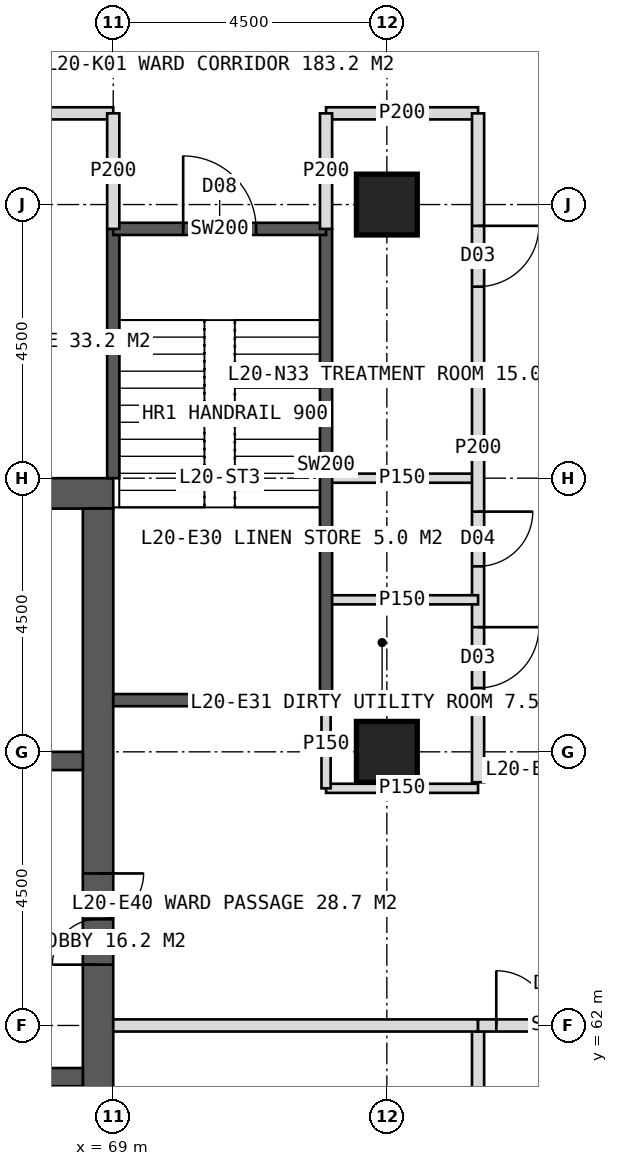
"""IFC4 building model, lengths in metres.
Left out: names, types, materials, properties, quantities, classifications, styles, units other than length and angle.
Written with IfcOpenShell. Run it as: python <this file> out.ifc"""

import sys

from ifc_helpers import new_model, si_unit, direction, frame, frame_2d, origin, origin_2d, place, context, subcontext, project, spatial, rectangle, hollow_rectangle, extrude, element, fill, save


model = new_model("IFC4")
c1 = context("Model", 3, precision=1e-05, world=origin(), true_north=direction((0.0, 1.0)))
c2 = subcontext(c1, "Body", "Model", "MODEL_VIEW")
j1 = project(units=[si_unit("LENGTHUNIT", "METRE"), si_unit("PLANEANGLEUNIT", "RADIAN")], contexts=[c1])
p1 = place(None, origin())
s1 = spatial("IfcSite", under=j1, at=p1, CompositionType="ELEMENT")
p2 = place(p1, origin())
s2 = spatial("IfcBuilding", under=s1, at=p2, CompositionType="ELEMENT")
p3 = place(p2, frame((0.0, 0.0, 87.0)))
s3 = spatial("IfcBuildingStorey", under=s2, at=p3, CompositionType="ELEMENT", Elevation=87.0)
p4 = place(p3, frame((51.0, 70.75, 0.0), z_axis=(0.0, 0.0, 1.0), x_axis=(1.0, 0.0, 0.0)))
e1 = element("IfcWall", 1, at=p4, inside=s3, PredefinedType="SHEAR", context=c2, shape_type="SweptSolid", body=[
    extrude(rectangle(XDim=18.0, YDim=0.5, at=frame_2d((9.0, 0.0))), origin(), (0.0, 0.0, 1.0), 4.0),
])
p5 = place(p4, frame((8.1, 0.0, 0.0)))
e2 = element("IfcOpeningElement", 2, at=p5, cuts=e1, PredefinedType="OPENING", context=c2, shape_type="SweptSolid", body=[
    extrude(rectangle(XDim=1.8, YDim=2.2, at=frame_2d((0.9, 1.1))), frame((0.0, 0.26, 0.0), z_axis=(0.0, -1.0, 0.0), x_axis=(1.0, 0.0, 0.0)), (0.0, 0.0, 1.0), 0.52),
])
p6 = place(p3, frame((68.75, 53.5, 0.0), z_axis=(0.0, 0.0, 1.0), x_axis=(0.0, 1.0, 0.0)))
e3 = element("IfcWall", 3, at=p6, inside=s3, PredefinedType="SHEAR", context=c2, shape_type="SweptSolid", body=[
    extrude(rectangle(XDim=17.0, YDim=0.5, at=frame_2d((8.5, 0.0))), origin(), (0.0, 0.0, 1.0), 4.0),
])
p7 = place(p6, frame((9.5, 0.0, 0.0)))
e4 = element("IfcOpeningElement", 4, at=p7, cuts=e3, PredefinedType="OPENING", context=c2, shape_type="SweptSolid", body=[
    extrude(rectangle(XDim=1.5, YDim=2.2, at=frame_2d((0.75, 1.1))), frame((0.0, 0.26, 0.0), z_axis=(0.0, -1.0, 0.0), x_axis=(1.0, 0.0, 0.0)), (0.0, 0.0, 1.0), 0.52),
])
p8 = place(p3, frame((65.2, 61.15, 0.0), z_axis=(0.0, 0.0, 1.0), x_axis=(1.0, 0.0, 0.0)))
e5 = element("IfcWall", 5, at=p8, inside=s3, PredefinedType="SHEAR", context=c2, shape_type="SweptSolid", body=[
    extrude(rectangle(XDim=3.3, YDim=0.3, at=frame_2d((1.65, 0.0))), origin(), (0.0, 0.0, 1.0), 4.0),
])
p9 = place(p8, frame((1.05, 0.0, 0.0)))
e6 = element("IfcOpeningElement", 6, at=p9, cuts=e5, PredefinedType="OPENING", context=c2, shape_type="SweptSolid", body=[
    extrude(rectangle(XDim=1.2, YDim=2.1, at=frame_2d((0.6, 1.05))), frame((0.0, 0.16, 0.0), z_axis=(0.0, -1.0, 0.0), x_axis=(1.0, 0.0, 0.0)), (0.0, 0.0, 1.0), 0.32),
])
p10 = place(p3, frame((65.2, 66.35, 0.0), z_axis=(0.0, 0.0, 1.0), x_axis=(1.0, 0.0, 0.0)))
e7 = element("IfcWall", 7, at=p10, inside=s3, PredefinedType="SHEAR", context=c2, shape_type="SweptSolid", body=[
    extrude(rectangle(XDim=3.3, YDim=0.3, at=frame_2d((1.65, 0.0))), origin(), (0.0, 0.0, 1.0), 4.0),
])
p11 = place(p10, frame((1.05, 0.0, 0.0)))
e8 = element("IfcOpeningElement", 8, at=p11, cuts=e7, PredefinedType="OPENING", context=c2, shape_type="SweptSolid", body=[
    extrude(rectangle(XDim=1.2, YDim=2.2, at=frame_2d((0.6, 1.1))), frame((0.0, 0.16, 0.0), z_axis=(0.0, -1.0, 0.0), x_axis=(1.0, 0.0, 0.0)), (0.0, 0.0, 1.0), 0.32),
])
for number, where, z_axis, x_axis in (
    (9, (73.5, 75.5, 0.0), (0.0, 0.0, 1.0), (1.0, 0.0, 0.0)),
    (10, (73.5, 66.5, 0.0), (0.0, 0.0, 1.0), (1.0, 0.0, 0.0)),
):
    element("IfcColumn", number, at=place(p3, frame(where, z_axis=z_axis, x_axis=x_axis)), inside=s3, PredefinedType="COLUMN", context=c2, shape_type="SweptSolid", body=[
        extrude(hollow_rectangle(XDim=1.0, YDim=1.0, WallThickness=0.1, at=origin_2d()), origin(), (0.0, 0.0, 1.0), 4.0),
    ])
p12 = place(p3, frame((62.25, 77.0, 0.0), z_axis=(0.0, 0.0, 1.0), x_axis=(1.0, 0.0, 0.0)))
e11 = element("IfcWall", 11, at=p12, inside=s3, PredefinedType="PARTITIONING", context=c2, shape_type="SweptSolid", body=[
    extrude(rectangle(XDim=6.75, YDim=0.2, at=frame_2d((3.375, 0.0))), origin(), (0.0, 0.0, 1.0), 3.75),
])
p13 = place(p12, frame((3.55, 0.0, 0.0)))
e12 = element("IfcOpeningElement", 12, at=p13, cuts=e11, PredefinedType="OPENING", context=c2, shape_type="SweptSolid", body=[
    extrude(rectangle(XDim=1.0, YDim=2.1, at=frame_2d((0.5, 1.05))), frame((0.0, 0.11, 0.0), z_axis=(0.0, -1.0, 0.0), x_axis=(1.0, 0.0, 0.0)), (0.0, 0.0, 1.0), 0.22),
])
p14 = place(p3, frame((72.5, 77.0, 0.0), z_axis=(0.0, 0.0, 1.0), x_axis=(1.0, 0.0, 0.0)))
e13 = element("IfcWall", 13, at=p14, inside=s3, PredefinedType="PARTITIONING", context=c2, shape_type="SweptSolid", body=[
    extrude(rectangle(XDim=2.5, YDim=0.2, at=frame_2d((1.25, 0.0))), origin(), (0.0, 0.0, 1.0), 3.75),
])
p15 = place(p3, frame((72.5, 71.0, 0.0), z_axis=(0.0, 0.0, 1.0), x_axis=(1.0, 0.0, 0.0)))
e14 = element("IfcWall", 14, at=p15, inside=s3, PredefinedType="PARTITIONING", context=c2, shape_type="SweptSolid", body=[
    extrude(rectangle(XDim=2.5, YDim=0.15, at=frame_2d((1.25, 0.0))), origin(), (0.0, 0.0, 1.0), 3.75),
])
p16 = place(p3, frame((75.0, 77.0, 0.0), z_axis=(0.0, 0.0, 1.0), x_axis=(0.0, -1.0, 0.0)))
e15 = element("IfcWall", 15, at=p16, inside=s3, PredefinedType="PARTITIONING", context=c2, shape_type="SweptSolid", body=[
    extrude(rectangle(XDim=11.0, YDim=0.2, at=frame_2d((5.5, 0.0))), origin(), (0.0, 0.0, 1.0), 3.75),
])
p17 = place(p16, frame((1.85, 0.0, 0.0)))
e16 = element("IfcOpeningElement", 16, at=p17, cuts=e15, PredefinedType="OPENING", context=c2, shape_type="SweptSolid", body=[
    extrude(rectangle(XDim=1.0, YDim=2.1, at=frame_2d((0.5, 1.05))), frame((0.0, 0.11, 0.0), z_axis=(0.0, -1.0, 0.0), x_axis=(1.0, 0.0, 0.0)), (0.0, 0.0, 1.0), 0.22),
])
p18 = place(p16, frame((6.55, 0.0, 0.0)))
e17 = element("IfcOpeningElement", 17, at=p18, cuts=e15, PredefinedType="OPENING", context=c2, shape_type="SweptSolid", body=[
    extrude(rectangle(XDim=0.9, YDim=2.1, at=frame_2d((0.45, 1.05))), frame((0.0, 0.11, 0.0), z_axis=(0.0, -1.0, 0.0), x_axis=(1.0, 0.0, 0.0)), (0.0, 0.0, 1.0), 0.22),
])
p19 = place(p16, frame((8.45, 0.0, 0.0)))
e18 = element("IfcOpeningElement", 18, at=p19, cuts=e15, PredefinedType="OPENING", context=c2, shape_type="SweptSolid", body=[
    extrude(rectangle(XDim=1.0, YDim=2.1, at=frame_2d((0.5, 1.05))), frame((0.0, 0.11, 0.0), z_axis=(0.0, -1.0, 0.0), x_axis=(1.0, 0.0, 0.0)), (0.0, 0.0, 1.0), 0.22),
])
p20 = place(p3, frame((75.0, 62.0, 0.0), z_axis=(0.0, 0.0, 1.0), x_axis=(0.0, -1.0, 0.0)))
e19 = element("IfcWall", 19, at=p20, inside=s3, PredefinedType="PARTITIONING", context=c2, shape_type="SweptSolid", body=[
    extrude(rectangle(XDim=15.0, YDim=0.2, at=frame_2d((7.5, 0.0))), origin(), (0.0, 0.0, 1.0), 3.75),
])
p21 = place(p20, frame((7.3, 0.0, 0.0)))
e20 = element("IfcOpeningElement", 20, at=p21, cuts=e19, PredefinedType="OPENING", context=c2, shape_type="SweptSolid", body=[
    extrude(rectangle(XDim=1.0, YDim=2.1, at=frame_2d((0.5, 1.05))), frame((0.0, 0.11, 0.0), z_axis=(0.0, -1.0, 0.0), x_axis=(1.0, 0.0, 0.0)), (0.0, 0.0, 1.0), 0.22),
])
p22 = place(p20, frame((11.2, 0.0, 0.0)))
e21 = element("IfcOpeningElement", 21, at=p22, cuts=e19, PredefinedType="OPENING", context=c2, shape_type="SweptSolid", body=[
    extrude(rectangle(XDim=1.0, YDim=2.1, at=frame_2d((0.5, 1.05))), frame((0.0, 0.11, 0.0), z_axis=(0.0, -1.0, 0.0), x_axis=(1.0, 0.0, 0.0)), (0.0, 0.0, 1.0), 0.22),
])
p23 = place(p3, frame((72.5, 65.9, 0.0), z_axis=(0.0, 0.0, 1.0), x_axis=(1.0, 0.0, 0.0)))
e22 = element("IfcWall", 22, at=p23, inside=s3, PredefinedType="PARTITIONING", context=c2, shape_type="SweptSolid", body=[
    extrude(rectangle(XDim=2.5, YDim=0.15, at=frame_2d((1.25, 0.0))), origin(), (0.0, 0.0, 1.0), 3.75),
])
p24 = place(p3, frame((69.0, 62.0, 0.0), z_axis=(0.0, 0.0, 1.0), x_axis=(1.0, 0.0, 0.0)))
e23 = element("IfcWall", 23, at=p24, inside=s3, PredefinedType="SOLIDWALL", context=c2, shape_type="SweptSolid", body=[
    extrude(rectangle(XDim=6.0, YDim=0.2, at=frame_2d((3.0, 0.0))), origin(), (0.0, 0.0, 1.0), 2.75),
])
p25 = place(p3, frame((72.5, 69.0, 0.0), z_axis=(0.0, 0.0, 1.0), x_axis=(1.0, 0.0, 0.0)))
e24 = element("IfcWall", 24, at=p25, inside=s3, PredefinedType="PARTITIONING", context=c2, shape_type="SweptSolid", body=[
    extrude(rectangle(XDim=2.5, YDim=0.15, at=frame_2d((1.25, 0.0))), origin(), (0.0, 0.0, 1.0), 3.75),
])
p26 = place(p3, frame((75.0, 62.0, 0.0), z_axis=(0.0, 0.0, 1.0), x_axis=(1.0, 0.0, 0.0)))
e25 = element("IfcWall", 25, at=p26, inside=s3, PredefinedType="SOLIDWALL", context=c2, shape_type="SweptSolid", body=[
    extrude(rectangle(XDim=2.7, YDim=0.2, at=frame_2d((1.35, 0.0))), origin(), (0.0, 0.0, 1.0), 2.75),
])
p27 = place(p26, frame((0.3, 0.0, 0.0)))
e26 = element("IfcOpeningElement", 26, at=p27, cuts=e25, PredefinedType="OPENING", context=c2, shape_type="SweptSolid", body=[
    extrude(rectangle(XDim=1.8, YDim=2.2, at=frame_2d((0.9, 1.1))), frame((0.0, 0.11, 0.0), z_axis=(0.0, -1.0, 0.0), x_axis=(1.0, 0.0, 0.0)), (0.0, 0.0, 1.0), 0.22),
])
p28 = place(p3, frame((72.5, 65.9, 0.0), z_axis=(0.0, 0.0, 1.0), x_axis=(0.0, 1.0, 0.0)))
e27 = element("IfcWall", 27, at=p28, inside=s3, PredefinedType="PARTITIONING", context=c2, shape_type="SweptSolid", body=[
    extrude(rectangle(XDim=1.45, YDim=0.15, at=frame_2d((0.725, 0.0))), origin(), (0.0, 0.0, 1.0), 3.75),
])
p29 = place(p3, frame((69.0, 71.0, 0.0), z_axis=(0.0, 0.0, 1.0), x_axis=(0.0, 1.0, 0.0)))
e28 = element("IfcWall", 28, at=p29, inside=s3, PredefinedType="SOLIDWALL", context=c2, shape_type="SweptSolid", body=[
    extrude(rectangle(XDim=4.1, YDim=0.2, at=frame_2d((2.05, 0.0))), origin(), (0.0, 0.0, 1.0), 3.75),
])
p30 = place(p3, frame((69.0, 67.35, 0.0), z_axis=(0.0, 0.0, 1.0), x_axis=(1.0, 0.0, 0.0)))
e29 = element("IfcWall", 29, at=p30, inside=s3, PredefinedType="SOLIDWALL", context=c2, shape_type="SweptSolid", body=[
    extrude(rectangle(XDim=3.5, YDim=0.2, at=frame_2d((1.75, 0.0))), origin(), (0.0, 0.0, 1.0), 3.75),
])
p31 = place(p3, frame((72.5, 67.35, 0.0), z_axis=(0.0, 0.0, 1.0), x_axis=(0.0, 1.0, 0.0)))
e30 = element("IfcWall", 30, at=p31, inside=s3, PredefinedType="SOLIDWALL", context=c2, shape_type="SweptSolid", body=[
    extrude(rectangle(XDim=7.75, YDim=0.2, at=frame_2d((3.875, 0.0))), origin(), (0.0, 0.0, 1.0), 3.75),
])
p32 = place(p3, frame((69.0, 75.1, 0.0), z_axis=(0.0, 0.0, 1.0), x_axis=(1.0, 0.0, 0.0)))
e31 = element("IfcWall", 31, at=p32, inside=s3, PredefinedType="SOLIDWALL", context=c2, shape_type="SweptSolid", body=[
    extrude(rectangle(XDim=3.5, YDim=0.2, at=frame_2d((1.75, 0.0))), origin(), (0.0, 0.0, 1.0), 3.75),
])
p33 = place(p32, frame((1.15, 0.0, 0.0)))
e32 = element("IfcOpeningElement", 32, at=p33, cuts=e31, PredefinedType="OPENING", context=c2, shape_type="SweptSolid", body=[
    extrude(rectangle(XDim=1.2, YDim=2.1, at=frame_2d((0.6, 1.05))), frame((0.0, 0.11, 0.0), z_axis=(0.0, -1.0, 0.0), x_axis=(1.0, 0.0, 0.0)), (0.0, 0.0, 1.0), 0.22),
])
for number, where, z_axis, x_axis in (
    (33, (69.0, 75.1, 0.0), (0.0, 0.0, 1.0), (0.0, 1.0, 0.0)),
    (34, (72.5, 75.1, 0.0), (0.0, 0.0, 1.0), (0.0, 1.0, 0.0)),
):
    element("IfcWall", number, at=place(p3, frame(where, z_axis=z_axis, x_axis=x_axis)), inside=s3, PredefinedType="PARTITIONING", context=c2, shape_type="SweptSolid", body=[
        extrude(rectangle(XDim=1.9, YDim=0.2, at=frame_2d((0.95, 0.0))), origin(), (0.0, 0.0, 1.0), 3.75),
    ])
p34 = place(p17, origin())
e35 = element("IfcDoor", 35, at=p34, inside=s3, OperationType="SINGLE_SWING_LEFT", PredefinedType="DOOR", context=c2, shape_type="SweptSolid", body=[
    extrude(rectangle(XDim=1.0, YDim=2.1, at=frame_2d((0.5, 1.05))), frame((0.0, 0.025, 0.0), z_axis=(0.0, -1.0, 0.0), x_axis=(1.0, 0.0, 0.0)), (0.0, 0.0, 1.0), 0.05),
])
fill(e16, e35)
p35 = place(p18, origin())
e36 = element("IfcDoor", 36, at=p35, inside=s3, OperationType="SINGLE_SWING_LEFT", PredefinedType="DOOR", context=c2, shape_type="SweptSolid", body=[
    extrude(rectangle(XDim=0.9, YDim=2.1, at=frame_2d((0.45, 1.05))), frame((0.0, 0.025, 0.0), z_axis=(0.0, -1.0, 0.0), x_axis=(1.0, 0.0, 0.0)), (0.0, 0.0, 1.0), 0.05),
])
fill(e17, e36)
p36 = place(p19, origin())
e37 = element("IfcDoor", 37, at=p36, inside=s3, OperationType="SINGLE_SWING_LEFT", PredefinedType="DOOR", context=c2, shape_type="SweptSolid", body=[
    extrude(rectangle(XDim=1.0, YDim=2.1, at=frame_2d((0.5, 1.05))), frame((0.0, 0.025, 0.0), z_axis=(0.0, -1.0, 0.0), x_axis=(1.0, 0.0, 0.0)), (0.0, 0.0, 1.0), 0.05),
])
fill(e18, e37)
p37 = place(p27, origin())
e38 = element("IfcDoor", 38, at=p37, inside=s3, OperationType="DOUBLE_DOOR_DOUBLE_SWING", PredefinedType="DOOR", context=c2, shape_type="SweptSolid", body=[
    extrude(rectangle(XDim=1.8, YDim=2.2, at=frame_2d((0.9, 1.1))), frame((0.0, 0.025, 0.0), z_axis=(0.0, -1.0, 0.0), x_axis=(1.0, 0.0, 0.0)), (0.0, 0.0, 1.0), 0.05),
])
fill(e26, e38)
p38 = place(p7, origin())
e39 = element("IfcDoor", 39, at=p38, inside=s3, OperationType="DOUBLE_DOOR_SINGLE_SWING", PredefinedType="DOOR", context=c2, shape_type="SweptSolid", body=[
    extrude(rectangle(XDim=1.5, YDim=2.2, at=frame_2d((0.75, 1.1))), frame((0.0, 0.025, 0.0), z_axis=(0.0, -1.0, 0.0), x_axis=(1.0, 0.0, 0.0)), (0.0, 0.0, 1.0), 0.05),
])
fill(e4, e39)
p39 = place(p33, origin())
e40 = element("IfcDoor", 40, at=p39, inside=s3, OperationType="SINGLE_SWING_LEFT", PredefinedType="DOOR", context=c2, shape_type="SweptSolid", body=[
    extrude(rectangle(XDim=1.2, YDim=2.1, at=frame_2d((0.6, 1.05))), frame((0.0, 0.025, 0.0), z_axis=(0.0, -1.0, 0.0), x_axis=(1.0, 0.0, 0.0)), (0.0, 0.0, 1.0), 0.05),
])
fill(e32, e40)
save(model, sys.argv[1])
